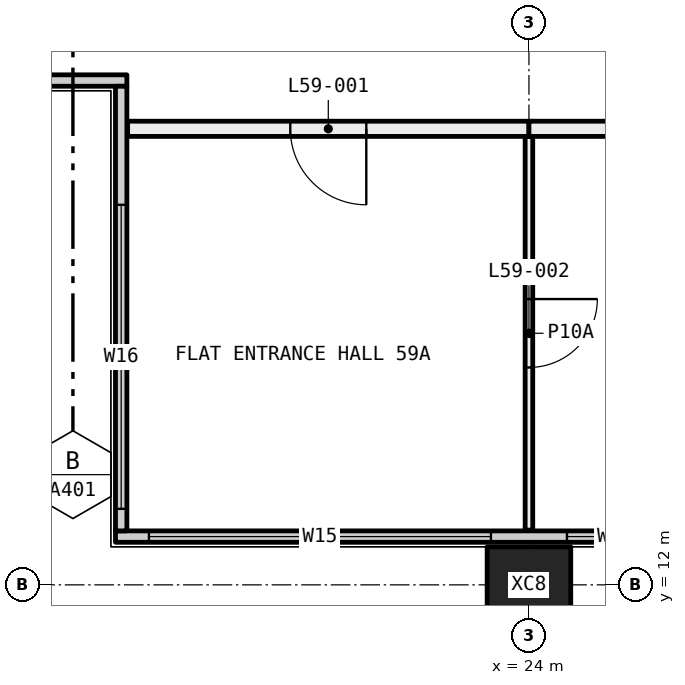
"""IFC4 building model, lengths in metres.
Left out: names, types, materials, properties, quantities, classifications, styles, units other than length and angle.
Written with IfcOpenShell. Run it as: python <this file> out.ifc"""

import sys

from ifc_helpers import new_model, si_unit, direction, frame, frame_2d, origin, origin_2d, place, context, subcontext, project, spatial, rectangle, hollow_rectangle, extrude, element, fill, save


model = new_model("IFC4")
c1 = context("Model", 3, precision=1e-05, world=origin(), true_north=direction((0.0, 1.0)))
c2 = subcontext(c1, "Body", "Model", "MODEL_VIEW")
j1 = project(units=[si_unit("LENGTHUNIT", "METRE"), si_unit("PLANEANGLEUNIT", "RADIAN")], contexts=[c1])
p1 = place(None, origin())
s1 = spatial("IfcSite", under=j1, at=p1, CompositionType="ELEMENT")
p2 = place(p1, origin())
s2 = spatial("IfcBuilding", under=s1, at=p2, CompositionType="ELEMENT")
p3 = place(p2, frame((0.0, 0.0, 221.4)))
s3 = spatial("IfcBuildingStorey", under=s2, at=p3, CompositionType="ELEMENT", Elevation=221.4)
p4 = place(p3, frame((24.0, 12.0, -0.4), z_axis=(0.0, 0.0, 1.0), x_axis=(1.0, 0.0, 0.0)))
e1 = element("IfcColumn", 1, at=p4, inside=s3, PredefinedType="COLUMN", context=c2, shape_type="SweptSolid", body=[
    extrude(hollow_rectangle(XDim=1.1, YDim=1.0, WallThickness=0.04, at=origin_2d()), origin(), (0.0, 0.0, 1.0), 3.45),
])
p5 = place(p3, frame((18.56, 12.635, 0.0), z_axis=(0.0, 0.0, 1.0), x_axis=(1.0, 0.0, 0.0)))
e2 = element("IfcWall", 2, at=p5, inside=s3, PredefinedType="ELEMENTEDWALL", context=c2, shape_type="SweptSolid", body=[
    extrude(rectangle(XDim=34.88, YDim=0.15, at=frame_2d((17.44, 0.0))), origin(), (0.0, 0.0, 1.0), 3.05),
])
p6 = place(p5, frame((0.44, 0.0, 0.45)))
e3 = element("IfcOpeningElement", 3, at=p6, cuts=e2, PredefinedType="OPENING", context=c2, shape_type="SweptSolid", body=[
    extrude(rectangle(XDim=4.5, YDim=2.55, at=frame_2d((2.25, 1.275))), frame((0.0, 0.085, 0.0), z_axis=(0.0, -1.0, 0.0), x_axis=(1.0, 0.0, 0.0)), (0.0, 0.0, 1.0), 0.17),
])
p7 = place(p5, frame((5.94, 0.0, 0.45)))
e4 = element("IfcOpeningElement", 4, at=p7, cuts=e2, PredefinedType="OPENING", context=c2, shape_type="SweptSolid", body=[
    extrude(rectangle(XDim=1.25, YDim=2.55, at=frame_2d((0.625, 1.275))), frame((0.0, 0.085, 0.0), z_axis=(0.0, -1.0, 0.0), x_axis=(1.0, 0.0, 0.0)), (0.0, 0.0, 1.0), 0.17),
])
p8 = place(p5, frame((9.69, 0.0, 0.45)))
e5 = element("IfcOpeningElement", 5, at=p8, cuts=e2, PredefinedType="OPENING", context=c2, shape_type="SweptSolid", body=[
    extrude(rectangle(XDim=1.25, YDim=2.55, at=frame_2d((0.625, 1.275))), frame((0.0, 0.085, 0.0), z_axis=(0.0, -1.0, 0.0), x_axis=(1.0, 0.0, 0.0)), (0.0, 0.0, 1.0), 0.17),
])
p9 = place(p5, frame((11.94, 0.0, 0.45)))
e6 = element("IfcOpeningElement", 6, at=p9, cuts=e2, PredefinedType="OPENING", context=c2, shape_type="SweptSolid", body=[
    extrude(rectangle(XDim=1.25, YDim=2.55, at=frame_2d((0.625, 1.275))), frame((0.0, 0.085, 0.0), z_axis=(0.0, -1.0, 0.0), x_axis=(1.0, 0.0, 0.0)), (0.0, 0.0, 1.0), 0.17),
])
p10 = place(p5, frame((15.69, 0.0, 0.45)))
e7 = element("IfcOpeningElement", 7, at=p10, cuts=e2, PredefinedType="OPENING", context=c2, shape_type="SweptSolid", body=[
    extrude(rectangle(XDim=1.25, YDim=2.55, at=frame_2d((0.625, 1.275))), frame((0.0, 0.085, 0.0), z_axis=(0.0, -1.0, 0.0), x_axis=(1.0, 0.0, 0.0)), (0.0, 0.0, 1.0), 0.17),
])
p11 = place(p5, frame((17.94, 0.0, 0.45)))
e8 = element("IfcOpeningElement", 8, at=p11, cuts=e2, PredefinedType="OPENING", context=c2, shape_type="SweptSolid", body=[
    extrude(rectangle(XDim=1.25, YDim=2.55, at=frame_2d((0.625, 1.275))), frame((0.0, 0.085, 0.0), z_axis=(0.0, -1.0, 0.0), x_axis=(1.0, 0.0, 0.0)), (0.0, 0.0, 1.0), 0.17),
])
p12 = place(p5, frame((21.69, 0.0, 0.45)))
e9 = element("IfcOpeningElement", 9, at=p12, cuts=e2, PredefinedType="OPENING", context=c2, shape_type="SweptSolid", body=[
    extrude(rectangle(XDim=1.25, YDim=2.55, at=frame_2d((0.625, 1.275))), frame((0.0, 0.085, 0.0), z_axis=(0.0, -1.0, 0.0), x_axis=(1.0, 0.0, 0.0)), (0.0, 0.0, 1.0), 0.17),
])
p13 = place(p5, frame((23.94, 0.0, 0.45)))
e10 = element("IfcOpeningElement", 10, at=p13, cuts=e2, PredefinedType="OPENING", context=c2, shape_type="SweptSolid", body=[
    extrude(rectangle(XDim=1.25, YDim=2.55, at=frame_2d((0.625, 1.275))), frame((0.0, 0.085, 0.0), z_axis=(0.0, -1.0, 0.0), x_axis=(1.0, 0.0, 0.0)), (0.0, 0.0, 1.0), 0.17),
])
p14 = place(p5, frame((27.69, 0.0, 0.45)))
e11 = element("IfcOpeningElement", 11, at=p14, cuts=e2, PredefinedType="OPENING", context=c2, shape_type="SweptSolid", body=[
    extrude(rectangle(XDim=1.25, YDim=2.55, at=frame_2d((0.625, 1.275))), frame((0.0, 0.085, 0.0), z_axis=(0.0, -1.0, 0.0), x_axis=(1.0, 0.0, 0.0)), (0.0, 0.0, 1.0), 0.17),
])
p15 = place(p5, frame((29.94, 0.0, 0.45)))
e12 = element("IfcOpeningElement", 12, at=p15, cuts=e2, PredefinedType="OPENING", context=c2, shape_type="SweptSolid", body=[
    extrude(rectangle(XDim=4.5, YDim=2.55, at=frame_2d((2.25, 1.275))), frame((0.0, 0.085, 0.0), z_axis=(0.0, -1.0, 0.0), x_axis=(1.0, 0.0, 0.0)), (0.0, 0.0, 1.0), 0.17),
])
p16 = place(p3, frame((12.56, 18.635, 0.0), z_axis=(0.0, 0.0, 1.0), x_axis=(1.0, 0.0, 0.0)))
e13 = element("IfcWall", 13, at=p16, inside=s3, PredefinedType="ELEMENTEDWALL", context=c2, shape_type="SweptSolid", body=[
    extrude(rectangle(XDim=6.15, YDim=0.15, at=frame_2d((3.075, 0.0))), origin(), (0.0, 0.0, 1.0), 3.05),
])
p17 = place(p16, frame((0.44, 0.0, 0.45)))
e14 = element("IfcOpeningElement", 14, at=p17, cuts=e13, PredefinedType="OPENING", context=c2, shape_type="SweptSolid", body=[
    extrude(rectangle(XDim=4.0, YDim=2.55, at=frame_2d((2.0, 1.275))), frame((0.0, 0.085, 0.0), z_axis=(0.0, -1.0, 0.0), x_axis=(1.0, 0.0, 0.0)), (0.0, 0.0, 1.0), 0.17),
])
p18 = place(p3, frame((18.635, 12.71, 0.0), z_axis=(0.0, 0.0, 1.0), x_axis=(0.0, 1.0, 0.0)))
e15 = element("IfcWall", 15, at=p18, inside=s3, PredefinedType="ELEMENTEDWALL", context=c2, shape_type="SweptSolid", body=[
    extrude(rectangle(XDim=5.85, YDim=0.15, at=frame_2d((2.925, 0.0))), origin(), (0.0, 0.0, 1.0), 3.05),
])
p19 = place(p18, frame((0.29, 0.0, 0.45)))
e16 = element("IfcOpeningElement", 16, at=p19, cuts=e15, PredefinedType="OPENING", context=c2, shape_type="SweptSolid", body=[
    extrude(rectangle(XDim=4.0, YDim=2.55, at=frame_2d((2.0, 1.275))), frame((0.0, 0.085, 0.0), z_axis=(0.0, -1.0, 0.0), x_axis=(1.0, 0.0, 0.0)), (0.0, 0.0, 1.0), 0.17),
])
p20 = place(p3, frame((24.0, 12.72, 0.0), z_axis=(0.0, 0.0, 1.0), x_axis=(0.0, 1.0, 0.0)))
e17 = element("IfcWall", 17, at=p20, inside=s3, PredefinedType="PARTITIONING", context=c2, shape_type="SweptSolid", body=[
    extrude(rectangle(XDim=5.18, YDim=0.1, at=frame_2d((2.59, 0.0))), origin(), (0.0, 0.0, 1.0), 3.05),
])
p21 = place(p20, frame((2.14, 0.0, 0.0)))
e18 = element("IfcOpeningElement", 18, at=p21, cuts=e17, PredefinedType="OPENING", context=c2, shape_type="SweptSolid", body=[
    extrude(rectangle(XDim=0.9, YDim=2.1, at=frame_2d((0.45, 1.05))), frame((0.0, 0.06, 0.0), z_axis=(0.0, -1.0, 0.0), x_axis=(1.0, 0.0, 0.0)), (0.0, 0.0, 1.0), 0.12),
])
p22 = place(p3, frame((24.0, 18.0, 0.0), z_axis=(0.0, 0.0, 1.0), x_axis=(-1.0, 0.0, 0.0)))
e19 = element("IfcWall", 19, at=p22, inside=s3, PredefinedType="PARTITIONING", context=c2, shape_type="SweptSolid", body=[
    extrude(rectangle(XDim=5.28, YDim=0.2, at=frame_2d((2.64, 0.0))), origin(), (0.0, 0.0, 1.0), 3.05),
])
p23 = place(p22, frame((2.14, 0.0, 0.0)))
e20 = element("IfcOpeningElement", 20, at=p23, cuts=e19, PredefinedType="OPENING", context=c2, shape_type="SweptSolid", body=[
    extrude(rectangle(XDim=1.0, YDim=2.1, at=frame_2d((0.5, 1.05))), frame((0.0, 0.11, 0.0), z_axis=(0.0, -1.0, 0.0), x_axis=(1.0, 0.0, 0.0)), (0.0, 0.0, 1.0), 0.22),
])
p24 = place(p3, frame((25.9, 18.0, 0.0), z_axis=(0.0, 0.0, 1.0), x_axis=(-1.0, 0.0, 0.0)))
e21 = element("IfcWall", 21, at=p24, inside=s3, PredefinedType="PARTITIONING", context=c2, shape_type="SweptSolid", body=[
    extrude(rectangle(XDim=1.9, YDim=0.2, at=frame_2d((0.95, 0.0))), origin(), (0.0, 0.0, 1.0), 3.05),
])
p25 = place(p6, origin())
e22 = element("IfcWindow", 22, at=p25, inside=s3, PartitioningType="SINGLE_PANEL", PredefinedType="WINDOW", context=c2, shape_type="SweptSolid", body=[
    extrude(rectangle(XDim=4.5, YDim=2.55, at=frame_2d((2.25, 1.275))), frame((0.0, 0.03, 0.0), z_axis=(0.0, -1.0, 0.0), x_axis=(1.0, 0.0, 0.0)), (0.0, 0.0, 1.0), 0.06),
])
fill(e3, e22)
p26 = place(p7, origin())
e23 = element("IfcWindow", 23, at=p26, inside=s3, PartitioningType="SINGLE_PANEL", PredefinedType="WINDOW", context=c2, shape_type="SweptSolid", body=[
    extrude(rectangle(XDim=1.25, YDim=2.55, at=frame_2d((0.625, 1.275))), frame((0.0, 0.03, 0.0), z_axis=(0.0, -1.0, 0.0), x_axis=(1.0, 0.0, 0.0)), (0.0, 0.0, 1.0), 0.06),
])
fill(e4, e23)
p27 = place(p19, origin())
e24 = element("IfcWindow", 24, at=p27, inside=s3, PartitioningType="SINGLE_PANEL", PredefinedType="WINDOW", context=c2, shape_type="SweptSolid", body=[
    extrude(rectangle(XDim=4.0, YDim=2.55, at=frame_2d((2.0, 1.275))), frame((0.0, 0.03, 0.0), z_axis=(0.0, -1.0, 0.0), x_axis=(1.0, 0.0, 0.0)), (0.0, 0.0, 1.0), 0.06),
])
fill(e16, e24)
p28 = place(p23, origin())
e25 = element("IfcDoor", 25, at=p28, inside=s3, OperationType="SINGLE_SWING_RIGHT", PredefinedType="DOOR", context=c2, shape_type="SweptSolid", body=[
    extrude(rectangle(XDim=1.0, YDim=2.1, at=frame_2d((0.5, 1.05))), frame((0.0, 0.025, 0.0), z_axis=(0.0, -1.0, 0.0), x_axis=(1.0, 0.0, 0.0)), (0.0, 0.0, 1.0), 0.05),
])
fill(e20, e25)
p29 = place(p21, frame((0.9, 0.0, 0.0), x_axis=(-1.0, 0.0, 0.0)))
e26 = element("IfcDoor", 26, at=p29, inside=s3, OperationType="SINGLE_SWING_RIGHT", PredefinedType="DOOR", context=c2, shape_type="SweptSolid", body=[
    extrude(rectangle(XDim=0.9, YDim=2.1, at=frame_2d((0.45, 1.05))), frame((0.0, 0.025, 0.0), z_axis=(0.0, -1.0, 0.0), x_axis=(1.0, 0.0, 0.0)), (0.0, 0.0, 1.0), 0.05),
])
fill(e18, e26)
save(model, sys.argv[1])
